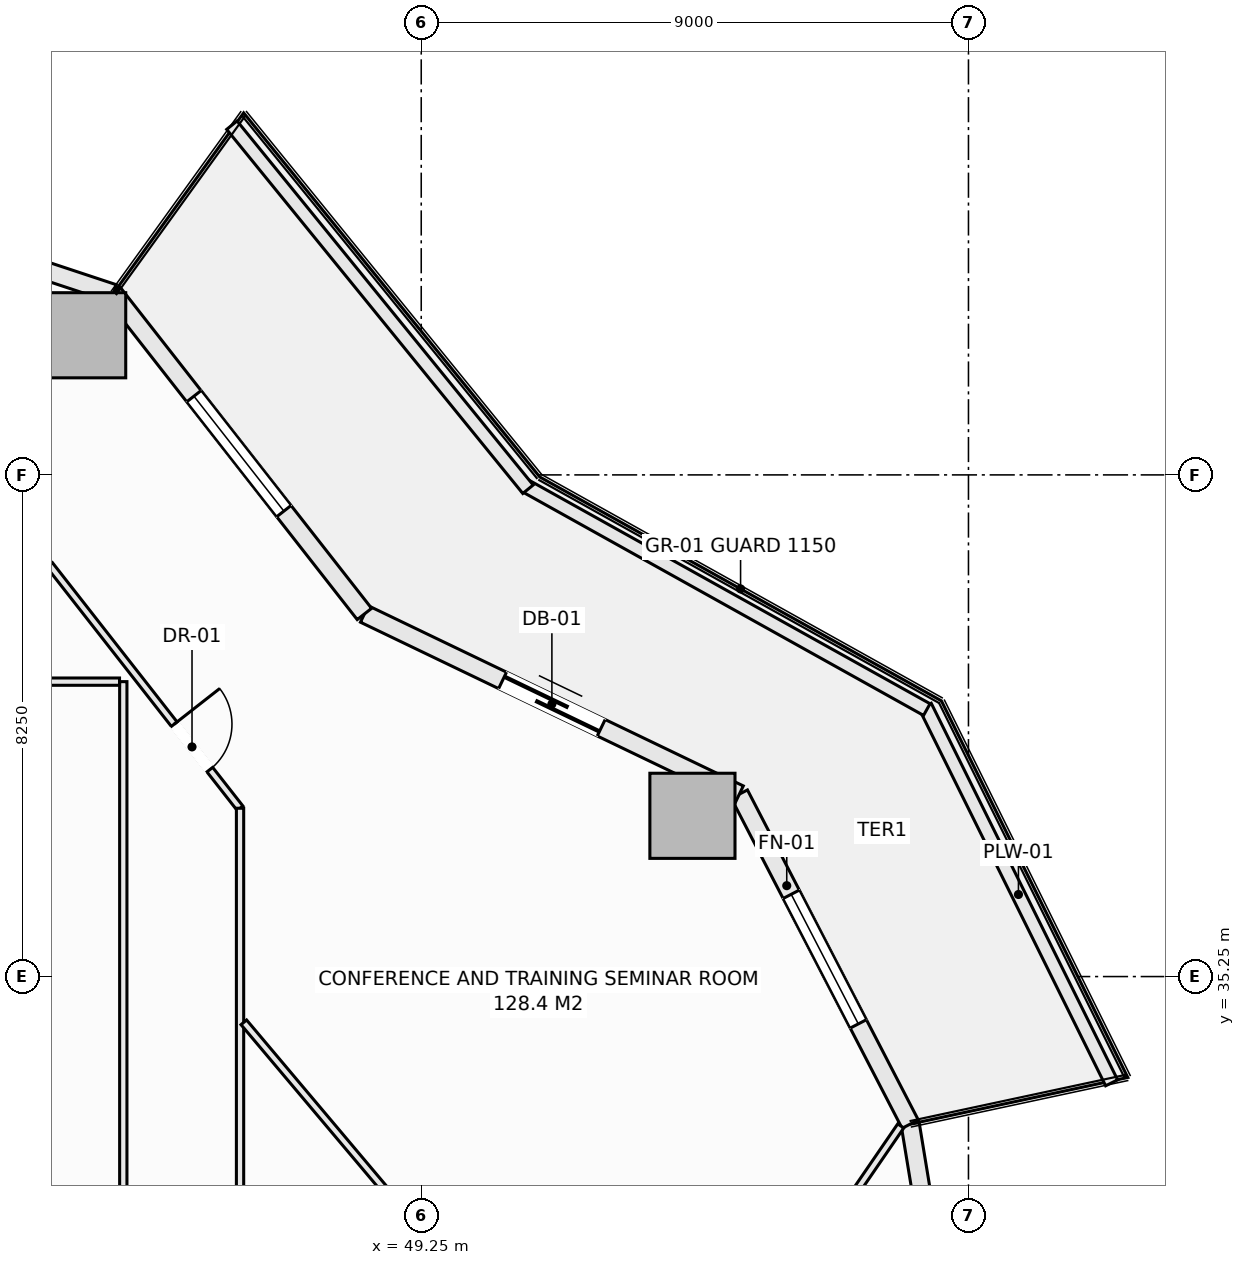
"""IFC4 building model, lengths in metres.
Left out: names, types, materials, properties, quantities, classifications, styles, units other than length and angle.
Written with IfcOpenShell. Run it as: python <this file> out.ifc"""

import sys

from ifc_helpers import new_model, si_unit, direction, frame, frame_2d, origin, origin_2d, place, context, subcontext, project, spatial, rectangle, extrude, element, fill, save


model = new_model("IFC4")
c1 = context("Model", 3, precision=1e-05, world=origin(), true_north=direction((0.0, 1.0)))
c2 = subcontext(c1, "Body", "Model", "MODEL_VIEW")
j1 = project(units=[si_unit("LENGTHUNIT", "METRE"), si_unit("PLANEANGLEUNIT", "RADIAN")], contexts=[c1])
p1 = place(None, origin())
s1 = spatial("IfcSite", under=j1, at=p1, CompositionType="ELEMENT")
p2 = place(p1, origin())
s2 = spatial("IfcBuilding", under=s1, at=p2, CompositionType="ELEMENT")
p3 = place(p2, frame((0.0, 0.0, 38.05)))
s3 = spatial("IfcBuildingStorey", under=s2, at=p3, CompositionType="ELEMENT", Elevation=38.05)
for number, where, z_axis, x_axis in (
    (1, (53.71, 37.894, -0.28), (0.0, 0.0, 1.0), (1.0, 0.0, 0.0)),
    (2, (43.69, 45.796, -0.28), (0.0, 0.0, 1.0), (1.0, 0.0, 0.0)),
):
    element("IfcColumn", number, at=place(p3, frame(where, z_axis=z_axis, x_axis=x_axis)), inside=s3, PredefinedType="COLUMN", context=c2, shape_type="SweptSolid", body=[
        extrude(rectangle(XDim=1.4, YDim=1.4, at=origin_2d()), origin(), (0.0, 0.0, 1.0), 3.85),
    ])
p4 = place(p3, frame((57.292, 32.823, 0.0), z_axis=(0.0, 0.0, 1.0), x_axis=(0.162366057843, -0.98673059305, 0.0)))
e3 = element("IfcWall", 3, at=p4, inside=s3, PredefinedType="SOLIDWALL", context=c2, shape_type="SweptSolid", body=[
    extrude(rectangle(XDim=5.902, YDim=0.3, at=frame_2d((2.951, 0.0))), origin(), (0.0, 0.0, 1.0), 3.093),
])
p5 = place(p4, frame((1.751, 0.0, 0.85)))
e4 = element("IfcOpeningElement", 4, at=p5, cuts=e3, PredefinedType="OPENING", context=c2, shape_type="SweptSolid", body=[
    extrude(rectangle(XDim=2.4, YDim=1.9, at=frame_2d((1.2, 0.95))), frame((0.0, 0.16, 0.0), z_axis=(0.0, -1.0, 0.0), x_axis=(1.0, 0.0, 0.0)), (0.0, 0.0, 1.0), 0.32),
])
p6 = place(p3, frame((54.482, 38.25, 0.0), z_axis=(0.0, 0.0, 1.0), x_axis=(0.459809804413, -0.88801742312, 0.0)))
e5 = element("IfcWall", 5, at=p6, inside=s3, PredefinedType="SOLIDWALL", context=c2, shape_type="SweptSolid", body=[
    extrude(rectangle(XDim=6.111, YDim=0.3, at=frame_2d((3.055, 0.0))), origin(), (0.0, 0.0, 1.0), 3.093),
])
p7 = place(p6, frame((1.855, 0.0, 0.85)))
e6 = element("IfcOpeningElement", 6, at=p7, cuts=e5, PredefinedType="OPENING", context=c2, shape_type="SweptSolid", body=[
    extrude(rectangle(XDim=2.4, YDim=1.9, at=frame_2d((1.2, 0.95))), frame((0.0, 0.16, 0.0), z_axis=(0.0, -1.0, 0.0), x_axis=(1.0, 0.0, 0.0)), (0.0, 0.0, 1.0), 0.32),
])
p8 = place(p3, frame((48.315, 41.213, 0.0), z_axis=(0.0, 0.0, 1.0), x_axis=(0.901360393999, -0.433069786673, 0.0)))
e7 = element("IfcWall", 7, at=p8, inside=s3, PredefinedType="SOLIDWALL", context=c2, shape_type="SweptSolid", body=[
    extrude(rectangle(XDim=6.842, YDim=0.3, at=frame_2d((3.421, 0.0))), origin(), (0.0, 0.0, 1.0), 3.093),
])
p9 = place(p8, frame((2.521, 0.0, 0.0)))
e8 = element("IfcOpeningElement", 8, at=p9, cuts=e7, PredefinedType="OPENING", context=c2, shape_type="SweptSolid", body=[
    extrude(rectangle(XDim=1.8, YDim=2.25, at=frame_2d((0.9, 1.125))), frame((0.0, 0.16, 0.0), z_axis=(0.0, -1.0, 0.0), x_axis=(1.0, 0.0, 0.0)), (0.0, 0.0, 1.0), 0.32),
])
p10 = place(p3, frame((44.188, 46.486, 0.0), z_axis=(0.0, 0.0, 1.0), x_axis=(0.616421309777, -0.787416515482, 0.0)))
e9 = element("IfcWall", 9, at=p10, inside=s3, PredefinedType="SOLIDWALL", context=c2, shape_type="SweptSolid", body=[
    extrude(rectangle(XDim=6.696, YDim=0.3, at=frame_2d((3.348, 0.0))), origin(), (0.0, 0.0, 1.0), 3.093),
])
p11 = place(p10, frame((2.148, 0.0, 0.85)))
e10 = element("IfcOpeningElement", 10, at=p11, cuts=e9, PredefinedType="OPENING", context=c2, shape_type="SweptSolid", body=[
    extrude(rectangle(XDim=2.4, YDim=1.9, at=frame_2d((1.2, 0.95))), frame((0.0, 0.16, 0.0), z_axis=(0.0, -1.0, 0.0), x_axis=(1.0, 0.0, 0.0)), (0.0, 0.0, 1.0), 0.32),
])
p12 = place(p3, frame((37.404, 48.733, 0.0), z_axis=(0.0, 0.0, 1.0), x_axis=(0.949238715533, -0.31455661006, 0.0)))
e11 = element("IfcWall", 11, at=p12, inside=s3, PredefinedType="SOLIDWALL", context=c2, shape_type="SweptSolid", body=[
    extrude(rectangle(XDim=7.146, YDim=0.3, at=frame_2d((3.573, 0.0))), origin(), (0.0, 0.0, 1.0), 3.093),
])
p13 = place(p12, frame((2.373, 0.0, 0.85)))
e12 = element("IfcOpeningElement", 12, at=p13, cuts=e11, PredefinedType="OPENING", context=c2, shape_type="SweptSolid", body=[
    extrude(rectangle(XDim=2.4, YDim=1.9, at=frame_2d((1.2, 0.95))), frame((0.0, 0.16, 0.0), z_axis=(0.0, -1.0, 0.0), x_axis=(1.0, 0.0, 0.0)), (0.0, 0.0, 1.0), 0.32),
])
p14 = place(p3, frame((57.539, 39.697, 0.0), z_axis=(0.0, 0.0, 1.0), x_axis=(0.443578479433, -0.8962355341, 0.0)))
e13 = element("IfcWall", 13, at=p14, inside=s3, PredefinedType="PARAPET", context=c2, shape_type="SweptSolid", body=[
    extrude(rectangle(XDim=6.911, YDim=0.22, at=frame_2d((3.456, 0.0))), origin(), (0.0, 0.0, 1.0), 0.52),
])
p15 = place(p3, frame((50.959, 43.322, 0.0), z_axis=(0.0, 0.0, 1.0), x_axis=(0.873500119739, -0.48682393205, 0.0)))
e14 = element("IfcWall", 14, at=p15, inside=s3, PredefinedType="PARAPET", context=c2, shape_type="SweptSolid", body=[
    extrude(rectangle(XDim=7.562, YDim=0.22, at=frame_2d((3.781, 0.0))), origin(), (0.0, 0.0, 1.0), 0.52),
])
p16 = place(p3, frame((46.136, 49.251, 0.0), z_axis=(0.0, 0.0, 1.0), x_axis=(0.630997450658, -0.775784903993, 0.0)))
e15 = element("IfcWall", 15, at=p16, inside=s3, PredefinedType="PARAPET", context=c2, shape_type="SweptSolid", body=[
    extrude(rectangle(XDim=7.718, YDim=0.22, at=frame_2d((3.859, 0.0))), origin(), (0.0, 0.0, 1.0), 0.52),
])
p17 = place(p3, frame((44.35, 31.182, 0.0), z_axis=(0.0, 0.0, 1.0), x_axis=(0.0, 1.0, 0.0)))
e16 = element("IfcWall", 16, at=p17, inside=s3, PredefinedType="PARTITIONING", context=c2, shape_type="SweptSolid", body=[
    extrude(rectangle(XDim=8.918, YDim=0.12, at=frame_2d((4.459, 0.0))), origin(), (0.0, 0.0, 1.0), 3.57),
])
p18 = place(p3, frame((30.557, 40.1, 0.0), z_axis=(0.0, 0.0, 1.0), x_axis=(1.0, 0.0, 0.0)))
e17 = element("IfcWall", 17, at=p18, inside=s3, PredefinedType="PARTITIONING", context=c2, shape_type="SweptSolid", body=[
    extrude(rectangle(XDim=13.731, YDim=0.12, at=frame_2d((6.866, 0.0))), origin(), (0.0, 0.0, 1.0), 3.57),
])
p19 = place(p18, frame((6.39, 0.0, 0.0)))
e18 = element("IfcOpeningElement", 18, at=p19, cuts=e17, PredefinedType="OPENING", context=c2, shape_type="SweptSolid", body=[
    extrude(rectangle(XDim=0.95, YDim=2.1, at=frame_2d((0.475, 1.05))), frame((0.0, 0.07, 0.0), z_axis=(0.0, -1.0, 0.0), x_axis=(1.0, 0.0, 0.0)), (0.0, 0.0, 1.0), 0.14),
])
p20 = place(p3, frame((43.137, 42.02, 0.0), z_axis=(0.0, 0.0, 1.0), x_axis=(0.616441660183, -0.787400583941, 0.0)))
e19 = element("IfcWall", 19, at=p20, inside=s3, PredefinedType="PARTITIONING", context=c2, shape_type="SweptSolid", body=[
    extrude(rectangle(XDim=5.083, YDim=0.12, at=frame_2d((2.541, 0.0))), origin(), (0.0, 0.0, 1.0), 3.57),
])
p21 = place(p20, frame((3.326, 0.0, 0.0)))
e20 = element("IfcOpeningElement", 20, at=p21, cuts=e19, PredefinedType="OPENING", context=c2, shape_type="SweptSolid", body=[
    extrude(rectangle(XDim=0.95, YDim=2.1, at=frame_2d((0.475, 1.05))), frame((0.0, 0.07, 0.0), z_axis=(0.0, -1.0, 0.0), x_axis=(1.0, 0.0, 0.0)), (0.0, 0.0, 1.0), 0.14),
])
p22 = place(p3, frame((46.27, 15.982, 0.0), z_axis=(0.0, 0.0, 1.0), x_axis=(0.0, 1.0, 0.0)))
e21 = element("IfcWall", 21, at=p22, inside=s3, PredefinedType="PARTITIONING", context=c2, shape_type="SweptSolid", body=[
    extrude(rectangle(XDim=22.036, YDim=0.12, at=frame_2d((11.018, 0.0))), origin(), (0.0, 0.0, 1.0), 3.57),
])
p23 = place(p22, frame((9.28, 0.0, 0.0)))
e22 = element("IfcOpeningElement", 22, at=p23, cuts=e21, PredefinedType="OPENING", context=c2, shape_type="SweptSolid", body=[
    extrude(rectangle(XDim=0.95, YDim=2.1, at=frame_2d((0.475, 1.05))), frame((0.0, 0.07, 0.0), z_axis=(0.0, -1.0, 0.0), x_axis=(1.0, 0.0, 0.0)), (0.0, 0.0, 1.0), 0.14),
])
p24 = place(p3, frame((46.332, 17.045, 0.0), z_axis=(0.0, 0.0, 1.0), x_axis=(0.565716902062, 0.824599531119, 0.0)))
e23 = element("IfcWall", 23, at=p24, inside=s3, PredefinedType="PARTITIONING", context=c2, shape_type="SweptSolid", body=[
    extrude(rectangle(XDim=19.098, YDim=0.12, at=frame_2d((9.549, 0.0))), origin(), (0.0, 0.0, 1.0), 3.57),
])
p25 = place(p3, frame((46.332, 34.497, 0.0), z_axis=(0.0, 0.0, 1.0), x_axis=(0.644329997074, -0.764747575917, 0.0)))
e24 = element("IfcWall", 24, at=p25, inside=s3, PredefinedType="PARTITIONING", context=c2, shape_type="SweptSolid", body=[
    extrude(rectangle(XDim=10.178, YDim=0.12, at=frame_2d((5.089, 0.0))), origin(), (0.0, 0.0, 1.0), 3.57),
])
p26 = place(p7, origin())
e25 = element("IfcWindow", 25, at=p26, inside=s3, PartitioningType="SINGLE_PANEL", PredefinedType="WINDOW", context=c2, shape_type="SweptSolid", body=[
    extrude(rectangle(XDim=2.4, YDim=1.9, at=frame_2d((1.2, 0.95))), frame((0.0, 0.03, 0.0), z_axis=(0.0, -1.0, 0.0), x_axis=(1.0, 0.0, 0.0)), (0.0, 0.0, 1.0), 0.06),
])
fill(e6, e25)
p27 = place(p9, origin())
e26 = element("IfcDoor", 26, at=p27, inside=s3, OperationType="SLIDING_TO_LEFT", PredefinedType="DOOR", context=c2, shape_type="SweptSolid", body=[
    extrude(rectangle(XDim=1.8, YDim=2.25, at=frame_2d((0.9, 1.125))), frame((0.0, 0.025, 0.0), z_axis=(0.0, -1.0, 0.0), x_axis=(1.0, 0.0, 0.0)), (0.0, 0.0, 1.0), 0.05),
])
fill(e8, e26)
p28 = place(p11, origin())
e27 = element("IfcWindow", 27, at=p28, inside=s3, PartitioningType="SINGLE_PANEL", PredefinedType="WINDOW", context=c2, shape_type="SweptSolid", body=[
    extrude(rectangle(XDim=2.4, YDim=1.9, at=frame_2d((1.2, 0.95))), frame((0.0, 0.03, 0.0), z_axis=(0.0, -1.0, 0.0), x_axis=(1.0, 0.0, 0.0)), (0.0, 0.0, 1.0), 0.06),
])
fill(e10, e27)
p29 = place(p21, origin())
e28 = element("IfcDoor", 28, at=p29, inside=s3, OperationType="SINGLE_SWING_LEFT", PredefinedType="DOOR", context=c2, shape_type="SweptSolid", body=[
    extrude(rectangle(XDim=0.95, YDim=2.1, at=frame_2d((0.475, 1.05))), frame((0.0, 0.025, 0.0), z_axis=(0.0, -1.0, 0.0), x_axis=(1.0, 0.0, 0.0)), (0.0, 0.0, 1.0), 0.05),
])
fill(e20, e28)
save(model, sys.argv[1])
